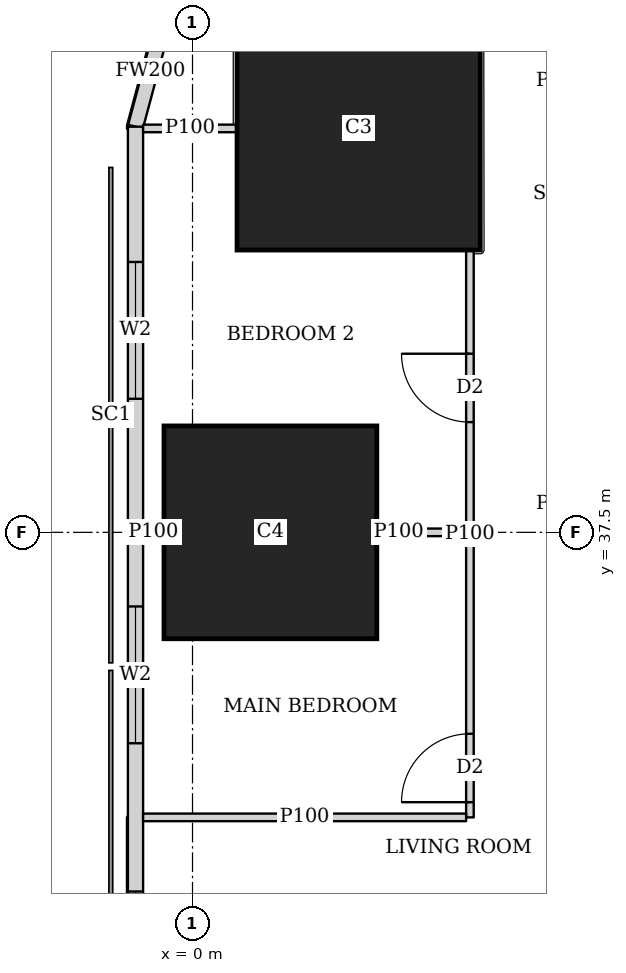
"""IFC4 building model, lengths in metres.
Left out: names, types, materials, properties, quantities, classifications, styles, units other than length and angle.
Written with IfcOpenShell. Run it as: python <this file> out.ifc"""

import sys

from ifc_helpers import new_model, si_unit, direction, frame, frame_2d, origin, origin_2d, place, context, subcontext, project, spatial, rectangle, extrude, element, fill, save


model = new_model("IFC4")
c1 = context("Model", 3, precision=1e-05, world=origin(), true_north=direction((0.0, 1.0)))
c2 = subcontext(c1, "Body", "Model", "MODEL_VIEW")
j1 = project(units=[si_unit("LENGTHUNIT", "METRE"), si_unit("PLANEANGLEUNIT", "RADIAN")], contexts=[c1])
p1 = place(None, origin())
s1 = spatial("IfcSite", under=j1, at=p1, CompositionType="ELEMENT")
p2 = place(p1, origin())
s2 = spatial("IfcBuilding", under=s1, at=p2, CompositionType="ELEMENT")
p3 = place(p2, frame((0.0, 0.0, 42.5)))
s3 = spatial("IfcBuildingStorey", under=s2, at=p3, CompositionType="ELEMENT", Elevation=42.5)
p4 = place(p3, frame((1.025, 37.5, 0.0), z_axis=(0.0, 0.0, 1.0), x_axis=(1.0, 0.0, 0.0)))
e1 = element("IfcColumn", 1, at=p4, inside=s3, PredefinedType="COLUMN", context=c2, shape_type="SweptSolid", body=[
    extrude(rectangle(XDim=2.8, YDim=2.8, at=origin_2d()), origin(), (0.0, 0.0, 1.0), 3.75),
])
p5 = place(p3, frame((2.186, 42.814, 0.0), z_axis=(0.0, 0.0, 1.0), x_axis=(1.0, 0.0, 0.0)))
e2 = element("IfcColumn", 2, at=p5, inside=s3, PredefinedType="COLUMN", context=c2, shape_type="SweptSolid", body=[
    extrude(rectangle(XDim=3.2, YDim=3.2, at=origin_2d()), origin(), (0.0, 0.0, 1.0), 3.75),
])
p6 = place(p3, frame((-0.358, 44.298, 0.0), z_axis=(0.0, 0.0, 1.0), x_axis=(-0.259168954497, -0.965832000415, 0.0)))
e3 = element("IfcWall", 3, at=p6, inside=s3, PredefinedType="SOLIDWALL", context=c2, shape_type="SweptSolid", body=[
    extrude(rectangle(XDim=1.513, YDim=0.2, at=frame_2d((0.756, 0.0))), origin(), (0.0, 0.0, 1.0), 3.5),
])
p7 = place(p3, frame((-0.75, 42.837, 0.0), z_axis=(0.0, 0.0, 1.0), x_axis=(0.0, -1.0, 0.0)))
e4 = element("IfcWall", 4, at=p7, inside=s3, PredefinedType="SOLIDWALL", context=c2, shape_type="SweptSolid", body=[
    extrude(rectangle(XDim=40.674, YDim=0.2, at=frame_2d((20.337, 0.0))), origin(), (0.0, 0.0, 1.0), 3.5),
])
p8 = place(p7, frame((1.78, 0.0, 0.9)))
e5 = element("IfcOpeningElement", 5, at=p8, cuts=e4, PredefinedType="OPENING", context=c2, shape_type="SweptSolid", body=[
    extrude(rectangle(XDim=1.8, YDim=1.5, at=frame_2d((0.9, 0.75))), frame((0.0, 0.11, 0.0), z_axis=(0.0, -1.0, 0.0), x_axis=(1.0, 0.0, 0.0)), (0.0, 0.0, 1.0), 0.22),
])
p9 = place(p7, frame((6.312, 0.0, 0.9)))
e6 = element("IfcOpeningElement", 6, at=p9, cuts=e4, PredefinedType="OPENING", context=c2, shape_type="SweptSolid", body=[
    extrude(rectangle(XDim=1.8, YDim=1.5, at=frame_2d((0.9, 0.75))), frame((0.0, 0.11, 0.0), z_axis=(0.0, -1.0, 0.0), x_axis=(1.0, 0.0, 0.0)), (0.0, 0.0, 1.0), 0.22),
])
p10 = place(p7, frame((10.062, 0.0, 0.9)))
e7 = element("IfcOpeningElement", 7, at=p10, cuts=e4, PredefinedType="OPENING", context=c2, shape_type="SweptSolid", body=[
    extrude(rectangle(XDim=1.8, YDim=1.5, at=frame_2d((0.9, 0.75))), frame((0.0, 0.11, 0.0), z_axis=(0.0, -1.0, 0.0), x_axis=(1.0, 0.0, 0.0)), (0.0, 0.0, 1.0), 0.22),
])
p11 = place(p7, frame((13.812, 0.0, 0.9)))
e8 = element("IfcOpeningElement", 8, at=p11, cuts=e4, PredefinedType="OPENING", context=c2, shape_type="SweptSolid", body=[
    extrude(rectangle(XDim=1.8, YDim=1.5, at=frame_2d((0.9, 0.75))), frame((0.0, 0.11, 0.0), z_axis=(0.0, -1.0, 0.0), x_axis=(1.0, 0.0, 0.0)), (0.0, 0.0, 1.0), 0.22),
])
p12 = place(p7, frame((17.562, 0.0, 0.9)))
e9 = element("IfcOpeningElement", 9, at=p12, cuts=e4, PredefinedType="OPENING", context=c2, shape_type="SweptSolid", body=[
    extrude(rectangle(XDim=1.8, YDim=1.5, at=frame_2d((0.9, 0.75))), frame((0.0, 0.11, 0.0), z_axis=(0.0, -1.0, 0.0), x_axis=(1.0, 0.0, 0.0)), (0.0, 0.0, 1.0), 0.22),
])
p13 = place(p7, frame((21.312, 0.0, 0.9)))
e10 = element("IfcOpeningElement", 10, at=p13, cuts=e4, PredefinedType="OPENING", context=c2, shape_type="SweptSolid", body=[
    extrude(rectangle(XDim=1.8, YDim=1.5, at=frame_2d((0.9, 0.75))), frame((0.0, 0.11, 0.0), z_axis=(0.0, -1.0, 0.0), x_axis=(1.0, 0.0, 0.0)), (0.0, 0.0, 1.0), 0.22),
])
p14 = place(p7, frame((25.062, 0.0, 0.9)))
e11 = element("IfcOpeningElement", 11, at=p14, cuts=e4, PredefinedType="OPENING", context=c2, shape_type="SweptSolid", body=[
    extrude(rectangle(XDim=1.8, YDim=1.5, at=frame_2d((0.9, 0.75))), frame((0.0, 0.11, 0.0), z_axis=(0.0, -1.0, 0.0), x_axis=(1.0, 0.0, 0.0)), (0.0, 0.0, 1.0), 0.22),
])
p15 = place(p7, frame((28.812, 0.0, 0.9)))
e12 = element("IfcOpeningElement", 12, at=p15, cuts=e4, PredefinedType="OPENING", context=c2, shape_type="SweptSolid", body=[
    extrude(rectangle(XDim=1.8, YDim=1.5, at=frame_2d((0.9, 0.75))), frame((0.0, 0.11, 0.0), z_axis=(0.0, -1.0, 0.0), x_axis=(1.0, 0.0, 0.0)), (0.0, 0.0, 1.0), 0.22),
])
p16 = place(p7, frame((32.562, 0.0, 0.9)))
e13 = element("IfcOpeningElement", 13, at=p16, cuts=e4, PredefinedType="OPENING", context=c2, shape_type="SweptSolid", body=[
    extrude(rectangle(XDim=1.8, YDim=1.5, at=frame_2d((0.9, 0.75))), frame((0.0, 0.11, 0.0), z_axis=(0.0, -1.0, 0.0), x_axis=(1.0, 0.0, 0.0)), (0.0, 0.0, 1.0), 0.22),
])
p17 = place(p7, frame((37.094, 0.0, 0.9)))
e14 = element("IfcOpeningElement", 14, at=p17, cuts=e4, PredefinedType="OPENING", context=c2, shape_type="SweptSolid", body=[
    extrude(rectangle(XDim=1.8, YDim=1.5, at=frame_2d((0.9, 0.75))), frame((0.0, 0.11, 0.0), z_axis=(0.0, -1.0, 0.0), x_axis=(1.0, 0.0, 0.0)), (0.0, 0.0, 1.0), 0.22),
])
p18 = place(p3, frame((3.65, 33.75, 0.0), z_axis=(0.0, 0.0, 1.0), x_axis=(0.0, 1.0, 0.0)))
e15 = element("IfcWall", 15, at=p18, inside=s3, PredefinedType="PARTITIONING", context=c2, shape_type="SweptSolid", body=[
    extrude(rectangle(XDim=7.463, YDim=0.1, at=frame_2d((3.731, 0.0))), origin(), (0.0, 0.0, 1.0), 3.5),
])
p19 = place(p18, frame((0.2, 0.0, 0.0)))
e16 = element("IfcOpeningElement", 16, at=p19, cuts=e15, PredefinedType="OPENING", context=c2, shape_type="SweptSolid", body=[
    extrude(rectangle(XDim=0.9, YDim=2.1, at=frame_2d((0.45, 1.05))), frame((0.0, 0.06, 0.0), z_axis=(0.0, -1.0, 0.0), x_axis=(1.0, 0.0, 0.0)), (0.0, 0.0, 1.0), 0.12),
])
p20 = place(p18, frame((5.2, 0.0, 0.0)))
e17 = element("IfcOpeningElement", 17, at=p20, cuts=e15, PredefinedType="OPENING", context=c2, shape_type="SweptSolid", body=[
    extrude(rectangle(XDim=0.9, YDim=2.1, at=frame_2d((0.45, 1.05))), frame((0.0, 0.06, 0.0), z_axis=(0.0, -1.0, 0.0), x_axis=(1.0, 0.0, 0.0)), (0.0, 0.0, 1.0), 0.12),
])
p21 = place(p3, frame((-0.65, 33.75, 0.0), z_axis=(0.0, 0.0, 1.0), x_axis=(1.0, 0.0, 0.0)))
e18 = element("IfcWall", 18, at=p21, inside=s3, PredefinedType="PARTITIONING", context=c2, shape_type="SweptSolid", body=[
    extrude(rectangle(XDim=4.25, YDim=0.1, at=frame_2d((2.125, 0.0))), origin(), (0.0, 0.0, 1.0), 2.05),
])
p22 = place(p3, frame((-0.65, 37.5, 0.0), z_axis=(0.0, 0.0, 1.0), x_axis=(1.0, 0.0, 0.0)))
e19 = element("IfcWall", 19, at=p22, inside=s3, PredefinedType="PARTITIONING", context=c2, shape_type="SweptSolid", body=[
    extrude(rectangle(XDim=0.274, YDim=0.1, at=frame_2d((0.137, 0.0))), origin(), (0.0, 0.0, 1.0), 3.5),
])
p23 = place(p3, frame((2.426, 37.5, 0.0), z_axis=(0.0, 0.0, 1.0), x_axis=(1.0, 0.0, 0.0)))
e20 = element("IfcWall", 20, at=p23, inside=s3, PredefinedType="PARTITIONING", context=c2, shape_type="SweptSolid", body=[
    extrude(rectangle(XDim=1.174, YDim=0.1, at=frame_2d((0.587, 0.0))), origin(), (0.0, 0.0, 1.0), 2.05),
])
p24 = place(p3, frame((-0.65, 42.814, 0.0), z_axis=(0.0, 0.0, 1.0), x_axis=(1.0, 0.0, 0.0)))
e21 = element("IfcWall", 21, at=p24, inside=s3, PredefinedType="PARTITIONING", context=c2, shape_type="SweptSolid", body=[
    extrude(rectangle(XDim=1.235, YDim=0.1, at=frame_2d((0.617, 0.0))), origin(), (0.0, 0.0, 1.0), 3.5),
])
p25 = place(p8, origin())
e22 = element("IfcWindow", 22, at=p25, inside=s3, PartitioningType="SINGLE_PANEL", PredefinedType="WINDOW", context=c2, shape_type="SweptSolid", body=[
    extrude(rectangle(XDim=1.8, YDim=1.5, at=frame_2d((0.9, 0.75))), frame((0.0, 0.03, 0.0), z_axis=(0.0, -1.0, 0.0), x_axis=(1.0, 0.0, 0.0)), (0.0, 0.0, 1.0), 0.06),
])
fill(e5, e22)
p26 = place(p9, origin())
e23 = element("IfcWindow", 23, at=p26, inside=s3, PartitioningType="SINGLE_PANEL", PredefinedType="WINDOW", context=c2, shape_type="SweptSolid", body=[
    extrude(rectangle(XDim=1.8, YDim=1.5, at=frame_2d((0.9, 0.75))), frame((0.0, 0.03, 0.0), z_axis=(0.0, -1.0, 0.0), x_axis=(1.0, 0.0, 0.0)), (0.0, 0.0, 1.0), 0.06),
])
fill(e6, e23)
p27 = place(p10, origin())
e24 = element("IfcWindow", 24, at=p27, inside=s3, PartitioningType="SINGLE_PANEL", PredefinedType="WINDOW", context=c2, shape_type="SweptSolid", body=[
    extrude(rectangle(XDim=1.8, YDim=1.5, at=frame_2d((0.9, 0.75))), frame((0.0, 0.03, 0.0), z_axis=(0.0, -1.0, 0.0), x_axis=(1.0, 0.0, 0.0)), (0.0, 0.0, 1.0), 0.06),
])
fill(e7, e24)
p28 = place(p19, origin())
e25 = element("IfcDoor", 25, at=p28, inside=s3, OperationType="SINGLE_SWING_LEFT", PredefinedType="DOOR", context=c2, shape_type="SweptSolid", body=[
    extrude(rectangle(XDim=0.9, YDim=2.1, at=frame_2d((0.45, 1.05))), frame((0.0, 0.025, 0.0), z_axis=(0.0, -1.0, 0.0), x_axis=(1.0, 0.0, 0.0)), (0.0, 0.0, 1.0), 0.05),
])
fill(e16, e25)
p29 = place(p20, origin())
e26 = element("IfcDoor", 26, at=p29, inside=s3, OperationType="SINGLE_SWING_RIGHT", PredefinedType="DOOR", context=c2, shape_type="SweptSolid", body=[
    extrude(rectangle(XDim=0.9, YDim=2.1, at=frame_2d((0.45, 1.05))), frame((0.0, 0.025, 0.0), z_axis=(0.0, -1.0, 0.0), x_axis=(1.0, 0.0, 0.0)), (0.0, 0.0, 1.0), 0.05),
])
fill(e17, e26)
save(model, sys.argv[1])
